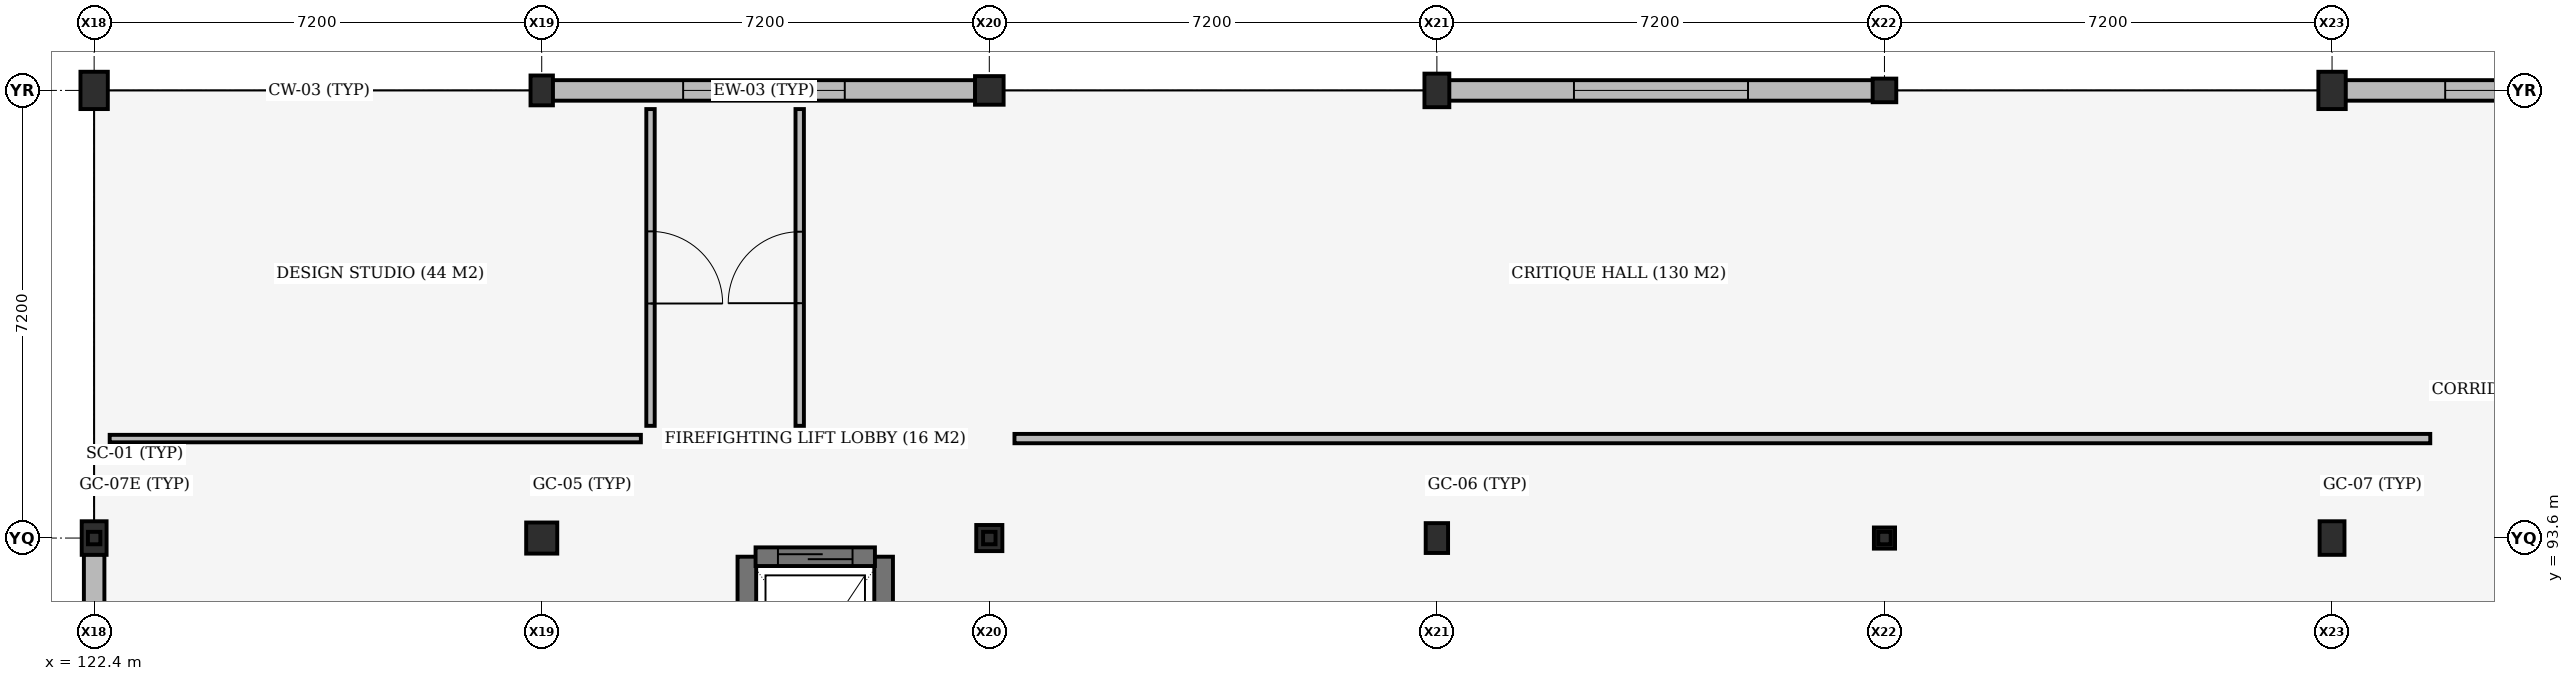
"""IFC4 building model, lengths in metres.
Left out: names, types, materials, properties, quantities, classifications, styles, units other than length and angle.
Written with IfcOpenShell. Run it as: python <this file> out.ifc"""

import sys

from ifc_helpers import new_model, si_unit, direction, frame, frame_2d, origin, origin_2d, place, context, subcontext, project, spatial, rectangle, i_section, extrude, element, fill, save


model = new_model("IFC4")
c1 = context("Model", 3, precision=1e-05, world=origin(), true_north=direction((0.0, 1.0)))
c2 = subcontext(c1, "Body", "Model", "MODEL_VIEW")
j1 = project(units=[si_unit("LENGTHUNIT", "METRE"), si_unit("PLANEANGLEUNIT", "RADIAN")], contexts=[c1])
p1 = place(None, origin())
s1 = spatial("IfcSite", under=j1, at=p1, CompositionType="ELEMENT")
p2 = place(p1, origin())
s2 = spatial("IfcBuilding", under=s1, at=p2, CompositionType="ELEMENT")
p3 = place(p2, frame((0.0, 0.0, 18.0)))
s3 = spatial("IfcBuildingStorey", under=s2, at=p3, CompositionType="ELEMENT", Elevation=18.0)
p4 = place(p3, frame((122.4, 93.6, 0.0), z_axis=(0.0, 0.0, 1.0), x_axis=(1.0, 0.0, 0.0)))
e1 = element("IfcColumn", 1, at=p4, inside=s3, PredefinedType="COLUMN", context=c2, shape_type="SweptSolid", body=[
    extrude(rectangle(XDim=0.4, YDim=0.54, at=origin_2d()), origin(), (0.0, 0.0, 1.0), 3.96),
])
p5 = place(p3, frame((122.4, 100.8, 0.0), z_axis=(0.0, 0.0, 1.0), x_axis=(1.0, 0.0, 0.0)))
e2 = element("IfcColumn", 2, at=p5, inside=s3, PredefinedType="COLUMN", context=c2, shape_type="SweptSolid", body=[
    extrude(rectangle(XDim=0.44, YDim=0.6, at=origin_2d()), origin(), (0.0, 0.0, 1.0), 3.96),
])
p6 = place(p3, frame((129.6, 93.6, 0.0), z_axis=(0.0, 0.0, 1.0), x_axis=(1.0, 0.0, 0.0)))
e3 = element("IfcColumn", 3, at=p6, inside=s3, PredefinedType="COLUMN", context=c2, shape_type="SweptSolid", body=[
    extrude(rectangle(XDim=0.5, YDim=0.5, at=origin_2d()), origin(), (0.0, 0.0, 1.0), 3.96),
])
p7 = place(p3, frame((129.6, 100.8, 0.0), z_axis=(0.0, 0.0, 1.0), x_axis=(1.0, 0.0, 0.0)))
e4 = element("IfcColumn", 4, at=p7, inside=s3, PredefinedType="COLUMN", context=c2, shape_type="SweptSolid", body=[
    extrude(rectangle(XDim=0.36, YDim=0.48, at=origin_2d()), origin(), (0.0, 0.0, 1.0), 3.96),
])
p8 = place(p3, frame((136.8, 93.6, 0.0), z_axis=(0.0, 0.0, 1.0), x_axis=(1.0, 0.0, 0.0)))
e5 = element("IfcColumn", 5, at=p8, inside=s3, PredefinedType="COLUMN", context=c2, shape_type="SweptSolid", body=[
    extrude(rectangle(XDim=0.42, YDim=0.42, at=origin_2d()), origin(), (0.0, 0.0, 1.0), 3.96),
])
p9 = place(p3, frame((136.8, 100.8, 0.0), z_axis=(0.0, 0.0, 1.0), x_axis=(1.0, 0.0, 0.0)))
e6 = element("IfcColumn", 6, at=p9, inside=s3, PredefinedType="COLUMN", context=c2, shape_type="SweptSolid", body=[
    extrude(rectangle(XDim=0.46, YDim=0.46, at=origin_2d()), origin(), (0.0, 0.0, 1.0), 3.96),
])
p10 = place(p3, frame((144.0, 93.6, 0.0), z_axis=(0.0, 0.0, 1.0), x_axis=(1.0, 0.0, 0.0)))
e7 = element("IfcColumn", 7, at=p10, inside=s3, PredefinedType="COLUMN", context=c2, shape_type="SweptSolid", body=[
    extrude(rectangle(XDim=0.36, YDim=0.48, at=origin_2d()), origin(), (0.0, 0.0, 1.0), 3.96),
])
p11 = place(p3, frame((144.0, 100.8, 0.0), z_axis=(0.0, 0.0, 1.0), x_axis=(1.0, 0.0, 0.0)))
e8 = element("IfcColumn", 8, at=p11, inside=s3, PredefinedType="COLUMN", context=c2, shape_type="SweptSolid", body=[
    extrude(rectangle(XDim=0.4, YDim=0.54, at=origin_2d()), origin(), (0.0, 0.0, 1.0), 3.96),
])
p12 = place(p3, frame((151.2, 93.6, 0.0), z_axis=(0.0, 0.0, 1.0), x_axis=(1.0, 0.0, 0.0)))
e9 = element("IfcColumn", 9, at=p12, inside=s3, PredefinedType="COLUMN", context=c2, shape_type="SweptSolid", body=[
    extrude(rectangle(XDim=0.34, YDim=0.34, at=origin_2d()), origin(), (0.0, 0.0, 1.0), 3.96),
])
p13 = place(p3, frame((151.2, 100.8, 0.0), z_axis=(0.0, 0.0, 1.0), x_axis=(1.0, 0.0, 0.0)))
e10 = element("IfcColumn", 10, at=p13, inside=s3, PredefinedType="COLUMN", context=c2, shape_type="SweptSolid", body=[
    extrude(rectangle(XDim=0.38, YDim=0.38, at=origin_2d()), origin(), (0.0, 0.0, 1.0), 3.96),
])
p14 = place(p3, frame((158.4, 93.6, 0.0), z_axis=(0.0, 0.0, 1.0), x_axis=(1.0, 0.0, 0.0)))
e11 = element("IfcColumn", 11, at=p14, inside=s3, PredefinedType="COLUMN", context=c2, shape_type="SweptSolid", body=[
    extrude(rectangle(XDim=0.4, YDim=0.54, at=origin_2d()), origin(), (0.0, 0.0, 1.0), 3.96),
])
p15 = place(p3, frame((158.4, 100.8, 0.0), z_axis=(0.0, 0.0, 1.0), x_axis=(1.0, 0.0, 0.0)))
e12 = element("IfcColumn", 12, at=p15, inside=s3, PredefinedType="COLUMN", context=c2, shape_type="SweptSolid", body=[
    extrude(rectangle(XDim=0.44, YDim=0.6, at=origin_2d()), origin(), (0.0, 0.0, 1.0), 3.96),
])
for number, where, z_axis, x_axis in (
    (13, (132.9, 93.3, 0.0), (0.0, 0.0, 1.0), (0.0, -1.0, 0.0)),
    (14, (135.1, 90.3, 0.0), (0.0, 0.0, 1.0), (0.0, 1.0, 0.0)),
):
    element("IfcWall", number, at=place(p3, frame(where, z_axis=z_axis, x_axis=x_axis)), inside=s3, PredefinedType="SHEAR", context=c2, shape_type="SweptSolid", body=[
        extrude(rectangle(XDim=3.0, YDim=0.3, at=frame_2d((1.5, 0.0))), origin(), (0.0, 0.0, 1.0), 3.64),
    ])
for number, where, z_axis, x_axis in (
    (15, (122.4, 93.6, 3.96), (0.0, 0.0, 1.0), (1.0, 0.0, 0.0)),
    (16, (136.8, 93.6, 3.96), (0.0, 0.0, 1.0), (1.0, 0.0, 0.0)),
    (17, (151.2, 93.6, 3.96), (0.0, 0.0, 1.0), (1.0, 0.0, 0.0)),
):
    element("IfcColumn", number, at=place(p3, frame(where, z_axis=z_axis, x_axis=x_axis)), inside=s3, PredefinedType="COLUMN", context=c2, shape_type="SweptSolid", body=[
        extrude(i_section(OverallWidth=0.2, OverallDepth=0.2, WebThickness=0.009, FlangeThickness=0.015, FilletRadius=0.018, at=origin_2d()), origin(), (0.0, 0.0, 1.0), 2.04),
    ])
p16 = place(p3, frame((129.772, 100.8, 0.0), z_axis=(0.0, 0.0, 1.0), x_axis=(1.0, 0.0, 0.0)))
e18 = element("IfcWall", 18, at=p16, inside=s3, PredefinedType="STANDARD", context=c2, shape_type="SweptSolid", body=[
    extrude(rectangle(XDim=6.806, YDim=0.33, at=frame_2d((3.403, 0.0))), origin(), (0.0, 0.0, 1.0), 3.96),
])
p17 = place(p16, frame((2.103, 0.0, 0.85)))
e19 = element("IfcOpeningElement", 19, at=p17, cuts=e18, PredefinedType="OPENING", context=c2, shape_type="SweptSolid", body=[
    extrude(rectangle(XDim=2.6, YDim=2.4, at=frame_2d((1.3, 1.2))), frame((0.0, 0.175, 0.0), z_axis=(0.0, -1.0, 0.0), x_axis=(1.0, 0.0, 0.0)), (0.0, 0.0, 1.0), 0.35),
])
p18 = place(p3, frame((144.192, 100.8, 0.0), z_axis=(0.0, 0.0, 1.0), x_axis=(1.0, 0.0, 0.0)))
e20 = element("IfcWall", 20, at=p18, inside=s3, PredefinedType="STANDARD", context=c2, shape_type="SweptSolid", body=[
    extrude(rectangle(XDim=6.826, YDim=0.33, at=frame_2d((3.413, 0.0))), origin(), (0.0, 0.0, 1.0), 3.96),
])
p19 = place(p18, frame((2.013, 0.0, 0.85)))
e21 = element("IfcOpeningElement", 21, at=p19, cuts=e20, PredefinedType="OPENING", context=c2, shape_type="SweptSolid", body=[
    extrude(rectangle(XDim=2.8, YDim=2.4, at=frame_2d((1.4, 1.2))), frame((0.0, 0.175, 0.0), z_axis=(0.0, -1.0, 0.0), x_axis=(1.0, 0.0, 0.0)), (0.0, 0.0, 1.0), 0.35),
])
p20 = place(p3, frame((158.612, 100.8, 0.0), z_axis=(0.0, 0.0, 1.0), x_axis=(1.0, 0.0, 0.0)))
e22 = element("IfcWall", 22, at=p20, inside=s3, PredefinedType="STANDARD", context=c2, shape_type="SweptSolid", body=[
    extrude(rectangle(XDim=6.816, YDim=0.33, at=frame_2d((3.408, 0.0))), origin(), (0.0, 0.0, 1.0), 3.96),
])
p21 = place(p20, frame((1.608, 0.0, 0.85)))
e23 = element("IfcOpeningElement", 23, at=p21, cuts=e22, PredefinedType="OPENING", context=c2, shape_type="SweptSolid", body=[
    extrude(rectangle(XDim=1.4, YDim=2.6, at=frame_2d((0.7, 1.3))), frame((0.0, 0.175, 0.0), z_axis=(0.0, -1.0, 0.0), x_axis=(1.0, 0.0, 0.0)), (0.0, 0.0, 1.0), 0.35),
])
p22 = place(p20, frame((3.808, 0.0, 0.85)))
e24 = element("IfcOpeningElement", 24, at=p22, cuts=e22, PredefinedType="OPENING", context=c2, shape_type="SweptSolid", body=[
    extrude(rectangle(XDim=1.4, YDim=2.6, at=frame_2d((0.7, 1.3))), frame((0.0, 0.175, 0.0), z_axis=(0.0, -1.0, 0.0), x_axis=(1.0, 0.0, 0.0)), (0.0, 0.0, 1.0), 0.35),
])
p23 = place(p3, frame((122.4, 86.632, 0.0), z_axis=(0.0, 0.0, 1.0), x_axis=(0.0, 1.0, 0.0)))
e25 = element("IfcWall", 25, at=p23, inside=s3, PredefinedType="STANDARD", context=c2, shape_type="SweptSolid", body=[
    extrude(rectangle(XDim=6.706, YDim=0.33, at=frame_2d((3.353, 0.0))), origin(), (0.0, 0.0, 1.0), 3.96),
])
p24 = place(p23, frame((1.953, 0.0, 0.85)))
e26 = element("IfcOpeningElement", 26, at=p24, cuts=e25, PredefinedType="OPENING", context=c2, shape_type="SweptSolid", body=[
    extrude(rectangle(XDim=2.8, YDim=2.4, at=frame_2d((1.4, 1.2))), frame((0.0, 0.175, 0.0), z_axis=(0.0, -1.0, 0.0), x_axis=(1.0, 0.0, 0.0)), (0.0, 0.0, 1.0), 0.35),
])
p25 = place(p3, frame((133.04, 93.3, 0.0), z_axis=(0.0, 0.0, 1.0), x_axis=(1.0, 0.0, 0.0)))
e27 = element("IfcWall", 27, at=p25, inside=s3, PredefinedType="SHEAR", context=c2, shape_type="SweptSolid", body=[
    extrude(rectangle(XDim=1.92, YDim=0.3, at=frame_2d((0.96, 0.0))), origin(), (0.0, 0.0, 1.0), 5.1),
])
p26 = place(p25, frame((0.36, 0.0, 0.0)))
e28 = element("IfcOpeningElement", 28, at=p26, cuts=e27, PredefinedType="OPENING", context=c2, shape_type="SweptSolid", body=[
    extrude(rectangle(XDim=1.2, YDim=2.1, at=frame_2d((0.6, 1.05))), frame((0.0, 0.16, 0.0), z_axis=(0.0, -1.0, 0.0), x_axis=(1.0, 0.0, 0.0)), (0.0, 0.0, 1.0), 0.32),
])
p27 = place(p3, frame((122.65, 95.2, 0.0), z_axis=(0.0, 0.0, 1.0), x_axis=(1.0, 0.0, 0.0)))
e29 = element("IfcWall", 29, at=p27, inside=s3, PredefinedType="PARTITIONING", context=c2, shape_type="SweptSolid", body=[
    extrude(rectangle(XDim=8.545, YDim=0.12, at=frame_2d((4.272, 0.0))), origin(), (0.0, 0.0, 1.0), 3.96),
])
p28 = place(p3, frame((131.35, 95.405, 0.0), z_axis=(0.0, 0.0, 1.0), x_axis=(0.0, 1.0, 0.0)))
e30 = element("IfcWall", 30, at=p28, inside=s3, PredefinedType="PARTITIONING", context=c2, shape_type="SweptSolid", body=[
    extrude(rectangle(XDim=5.095, YDim=0.135, at=frame_2d((2.547, 0.0))), origin(), (0.0, 0.0, 1.0), 3.96),
])
p29 = place(p28, frame((1.968, 0.0, 0.0)))
e31 = element("IfcOpeningElement", 31, at=p29, cuts=e30, PredefinedType="OPENING", context=c2, shape_type="SweptSolid", body=[
    extrude(rectangle(XDim=1.16, YDim=2.2, at=frame_2d((0.58, 1.1))), frame((0.0, 0.077, 0.0), z_axis=(0.0, -1.0, 0.0), x_axis=(1.0, 0.0, 0.0)), (0.0, 0.0, 1.0), 0.155),
])
p30 = place(p3, frame((133.75, 95.405, 0.0), z_axis=(0.0, 0.0, 1.0), x_axis=(0.0, 1.0, 0.0)))
e32 = element("IfcWall", 32, at=p30, inside=s3, PredefinedType="PARTITIONING", context=c2, shape_type="SweptSolid", body=[
    extrude(rectangle(XDim=5.095, YDim=0.135, at=frame_2d((2.547, 0.0))), origin(), (0.0, 0.0, 1.0), 3.96),
])
p31 = place(p30, frame((1.972, 0.0, 0.0)))
e33 = element("IfcOpeningElement", 33, at=p31, cuts=e32, PredefinedType="OPENING", context=c2, shape_type="SweptSolid", body=[
    extrude(rectangle(XDim=1.15, YDim=2.2, at=frame_2d((0.575, 1.1))), frame((0.0, 0.077, 0.0), z_axis=(0.0, -1.0, 0.0), x_axis=(1.0, 0.0, 0.0)), (0.0, 0.0, 1.0), 0.155),
])
p32 = place(p3, frame((137.205, 95.2, 0.0), z_axis=(0.0, 0.0, 1.0), x_axis=(1.0, 0.0, 0.0)))
e34 = element("IfcWall", 34, at=p32, inside=s3, PredefinedType="PARTITIONING", context=c2, shape_type="SweptSolid", body=[
    extrude(rectangle(XDim=22.775, YDim=0.15, at=frame_2d((11.387, 0.0))), origin(), (0.0, 0.0, 1.0), 3.96),
])
p33 = place(p17, origin())
e35 = element("IfcWindow", 35, at=p33, inside=s3, PartitioningType="DOUBLE_PANEL_VERTICAL", PredefinedType="WINDOW", context=c2, shape_type="SweptSolid", body=[
    extrude(rectangle(XDim=2.6, YDim=2.4, at=frame_2d((1.3, 1.2))), frame((0.0, 0.03, 0.0), z_axis=(0.0, -1.0, 0.0), x_axis=(1.0, 0.0, 0.0)), (0.0, 0.0, 1.0), 0.06),
])
fill(e19, e35)
p34 = place(p19, origin())
e36 = element("IfcWindow", 36, at=p34, inside=s3, PartitioningType="DOUBLE_PANEL_VERTICAL", PredefinedType="WINDOW", context=c2, shape_type="SweptSolid", body=[
    extrude(rectangle(XDim=2.8, YDim=2.4, at=frame_2d((1.4, 1.2))), frame((0.0, 0.03, 0.0), z_axis=(0.0, -1.0, 0.0), x_axis=(1.0, 0.0, 0.0)), (0.0, 0.0, 1.0), 0.06),
])
fill(e21, e36)
p35 = place(p21, origin())
e37 = element("IfcWindow", 37, at=p35, inside=s3, PartitioningType="DOUBLE_PANEL_VERTICAL", PredefinedType="WINDOW", context=c2, shape_type="SweptSolid", body=[
    extrude(rectangle(XDim=1.4, YDim=2.6, at=frame_2d((0.7, 1.3))), frame((0.0, 0.03, 0.0), z_axis=(0.0, -1.0, 0.0), x_axis=(1.0, 0.0, 0.0)), (0.0, 0.0, 1.0), 0.06),
])
fill(e23, e37)
p36 = place(p26, origin())
e38 = element("IfcDoor", 38, at=p36, inside=s3, OperationType="SLIDING_TO_LEFT", PredefinedType="DOOR", context=c2, shape_type="SweptSolid", body=[
    extrude(rectangle(XDim=1.2, YDim=2.1, at=frame_2d((0.6, 1.05))), frame((0.0, 0.025, 0.0), z_axis=(0.0, -1.0, 0.0), x_axis=(1.0, 0.0, 0.0)), (0.0, 0.0, 1.0), 0.05),
])
fill(e28, e38)
p37 = place(p29, origin())
e39 = element("IfcDoor", 39, at=p37, inside=s3, OperationType="SINGLE_SWING_RIGHT", PredefinedType="DOOR", context=c2, shape_type="SweptSolid", body=[
    extrude(rectangle(XDim=1.16, YDim=2.2, at=frame_2d((0.58, 1.1))), frame((0.0, 0.025, 0.0), z_axis=(0.0, -1.0, 0.0), x_axis=(1.0, 0.0, 0.0)), (0.0, 0.0, 1.0), 0.05),
])
fill(e31, e39)
p38 = place(p31, origin())
e40 = element("IfcDoor", 40, at=p38, inside=s3, OperationType="SINGLE_SWING_LEFT", PredefinedType="DOOR", context=c2, shape_type="SweptSolid", body=[
    extrude(rectangle(XDim=1.15, YDim=2.2, at=frame_2d((0.575, 1.1))), frame((0.0, 0.025, 0.0), z_axis=(0.0, -1.0, 0.0), x_axis=(1.0, 0.0, 0.0)), (0.0, 0.0, 1.0), 0.05),
])
fill(e33, e40)
save(model, sys.argv[1])
